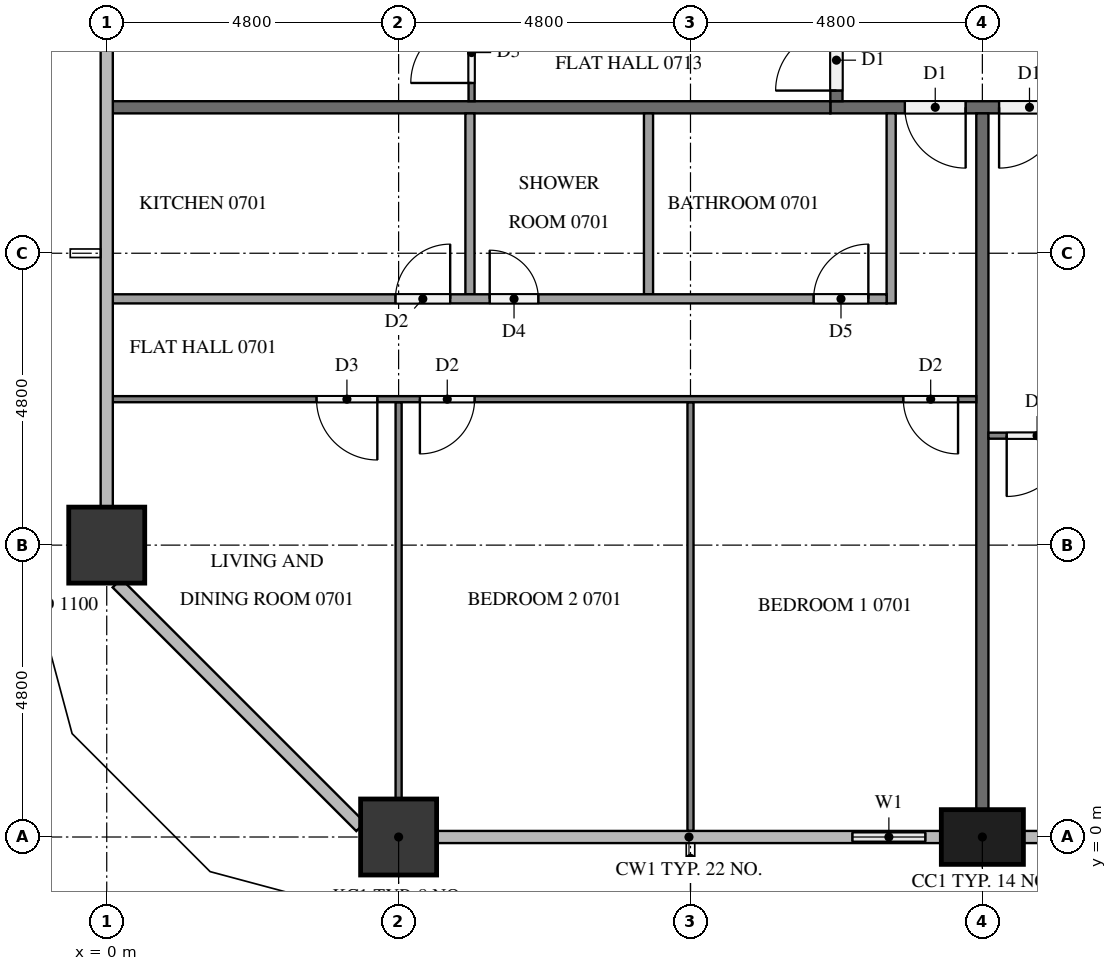
"""IFC4 building model, lengths in metres.
Left out: names, types, materials, properties, quantities, classifications, styles, units other than length and angle.
Written with IfcOpenShell. Run it as: python <this file> out.ifc"""

import sys

from ifc_helpers import new_model, si_unit, direction, frame, frame_2d, origin, origin_2d, place, context, subcontext, project, spatial, rectangle, extrude, element, fill, save


model = new_model("IFC4")
c1 = context("Model", 3, precision=1e-05, world=origin(), true_north=direction((0.0, 1.0)))
c2 = subcontext(c1, "Body", "Model", "MODEL_VIEW")
j1 = project(units=[si_unit("LENGTHUNIT", "METRE"), si_unit("PLANEANGLEUNIT", "RADIAN")], contexts=[c1])
p1 = place(None, origin())
s1 = spatial("IfcSite", under=j1, at=p1, CompositionType="ELEMENT")
p2 = place(p1, origin())
s2 = spatial("IfcBuilding", under=s1, at=p2, CompositionType="ELEMENT")
p3 = place(p2, frame((0.0, 0.0, 32.9)))
s3 = spatial("IfcBuildingStorey", under=s2, at=p3, CompositionType="ELEMENT", Elevation=32.9)
p4 = place(p3, frame((4.8, 0.0, 0.0), z_axis=(0.0, 0.0, 1.0), x_axis=(1.0, 0.0, 0.0)))
e1 = element("IfcColumn", 1, at=p4, inside=s3, PredefinedType="COLUMN", context=c2, shape_type="SweptSolid", body=[
    extrude(rectangle(XDim=1.25, YDim=1.25, at=origin_2d()), origin(), (0.0, 0.0, 1.0), 3.2),
])
p5 = place(p3, frame((14.4, 0.0, 0.0), z_axis=(0.0, 0.0, 1.0), x_axis=(1.0, 0.0, 0.0)))
e2 = element("IfcColumn", 2, at=p5, inside=s3, PredefinedType="COLUMN", context=c2, shape_type="SweptSolid", body=[
    extrude(rectangle(XDim=1.35, YDim=0.9, at=origin_2d()), origin(), (0.0, 0.0, 1.0), 3.2),
])
p6 = place(p3, frame((0.0, 4.8, 0.0), z_axis=(0.0, 0.0, 1.0), x_axis=(1.0, 0.0, 0.0)))
e3 = element("IfcColumn", 3, at=p6, inside=s3, PredefinedType="COLUMN", context=c2, shape_type="SweptSolid", body=[
    extrude(rectangle(XDim=1.25, YDim=1.25, at=origin_2d()), origin(), (0.0, 0.0, 1.0), 3.2),
])
p7 = place(p3, frame((12.0, 0.0, 0.0), z_axis=(0.0, 0.0, 1.0), x_axis=(1.0, 0.0, 0.0)))
e4 = element("IfcWall", 4, at=p7, inside=s3, PredefinedType="SOLIDWALL", context=c2, shape_type="SweptSolid", body=[
    extrude(rectangle(XDim=1.725, YDim=0.15, at=frame_2d((0.863, 0.0))), origin(), (0.0, 0.0, 1.0), 3.2),
])
p8 = place(p7, frame((0.262, 0.0, 0.9)))
e5 = element("IfcOpeningElement", 5, at=p8, cuts=e4, PredefinedType="OPENING", context=c2, shape_type="SweptSolid", body=[
    extrude(rectangle(XDim=1.2, YDim=1.4, at=frame_2d((0.6, 0.7))), frame((0.0, 0.085, 0.0), z_axis=(0.0, -1.0, 0.0), x_axis=(1.0, 0.0, 0.0)), (0.0, 0.0, 1.0), 0.17),
])
p9 = place(p3, frame((50.5, 12.0, 0.0), z_axis=(0.0, 0.0, 1.0), x_axis=(-1.0, 0.0, 0.0)))
e6 = element("IfcWall", 6, at=p9, inside=s3, PredefinedType="PARTITIONING", context=c2, shape_type="SweptSolid", body=[
    extrude(rectangle(XDim=38.6, YDim=0.2, at=frame_2d((19.3, 0.0))), origin(), (0.0, 0.0, 1.0), 3.2),
])
p10 = place(p9, frame((36.375, 0.0, 0.0)))
e7 = element("IfcOpeningElement", 7, at=p10, cuts=e6, PredefinedType="OPENING", context=c2, shape_type="SweptSolid", body=[
    extrude(rectangle(XDim=1.0, YDim=2.1, at=frame_2d((0.5, 1.05))), frame((0.0, 0.11, 0.0), z_axis=(0.0, -1.0, 0.0), x_axis=(1.0, 0.0, 0.0)), (0.0, 0.0, 1.0), 0.22),
])
p11 = place(p9, frame((34.825, 0.0, 0.0)))
e8 = element("IfcOpeningElement", 8, at=p11, cuts=e6, PredefinedType="OPENING", context=c2, shape_type="SweptSolid", body=[
    extrude(rectangle(XDim=1.0, YDim=2.1, at=frame_2d((0.5, 1.05))), frame((0.0, 0.11, 0.0), z_axis=(0.0, -1.0, 0.0), x_axis=(1.0, 0.0, 0.0)), (0.0, 0.0, 1.0), 0.22),
])
p12 = place(p9, frame((22.825, 0.0, 0.0)))
e9 = element("IfcOpeningElement", 9, at=p12, cuts=e6, PredefinedType="OPENING", context=c2, shape_type="SweptSolid", body=[
    extrude(rectangle(XDim=1.0, YDim=2.1, at=frame_2d((0.5, 1.05))), frame((0.0, 0.11, 0.0), z_axis=(0.0, -1.0, 0.0), x_axis=(1.0, 0.0, 0.0)), (0.0, 0.0, 1.0), 0.22),
])
p13 = place(p9, frame((8.425, 0.0, 0.0)))
e10 = element("IfcOpeningElement", 10, at=p13, cuts=e6, PredefinedType="OPENING", context=c2, shape_type="SweptSolid", body=[
    extrude(rectangle(XDim=1.0, YDim=2.1, at=frame_2d((0.5, 1.05))), frame((0.0, 0.11, 0.0), z_axis=(0.0, -1.0, 0.0), x_axis=(1.0, 0.0, 0.0)), (0.0, 0.0, 1.0), 0.22),
])
p14 = place(p9, frame((1.225, 0.0, 0.0)))
e11 = element("IfcOpeningElement", 11, at=p14, cuts=e6, PredefinedType="OPENING", context=c2, shape_type="SweptSolid", body=[
    extrude(rectangle(XDim=1.0, YDim=2.1, at=frame_2d((0.5, 1.05))), frame((0.0, 0.11, 0.0), z_axis=(0.0, -1.0, 0.0), x_axis=(1.0, 0.0, 0.0)), (0.0, 0.0, 1.0), 0.22),
])
p15 = place(p3, frame((12.0, 12.1, 0.0), z_axis=(0.0, 0.0, 1.0), x_axis=(0.0, 1.0, 0.0)))
e12 = element("IfcWall", 12, at=p15, inside=s3, PredefinedType="PARTITIONING", context=c2, shape_type="SweptSolid", body=[
    extrude(rectangle(XDim=28.6, YDim=0.2, at=frame_2d((14.3, 0.0))), origin(), (0.0, 0.0, 1.0), 3.2),
])
p16 = place(p15, frame((16.975, 0.0, 0.0)))
e13 = element("IfcOpeningElement", 13, at=p16, cuts=e12, PredefinedType="OPENING", context=c2, shape_type="SweptSolid", body=[
    extrude(rectangle(XDim=1.0, YDim=2.1, at=frame_2d((0.5, 1.05))), frame((0.0, 0.11, 0.0), z_axis=(0.0, -1.0, 0.0), x_axis=(1.0, 0.0, 0.0)), (0.0, 0.0, 1.0), 0.22),
])
p17 = place(p15, frame((0.175, 0.0, 0.0)))
e14 = element("IfcOpeningElement", 14, at=p17, cuts=e12, PredefinedType="OPENING", context=c2, shape_type="SweptSolid", body=[
    extrude(rectangle(XDim=1.0, YDim=2.1, at=frame_2d((0.5, 1.05))), frame((0.0, 0.11, 0.0), z_axis=(0.0, -1.0, 0.0), x_axis=(1.0, 0.0, 0.0)), (0.0, 0.0, 1.0), 0.22),
])
p18 = place(p3, frame((14.4, 11.9, 0.0), z_axis=(0.0, 0.0, 1.0), x_axis=(0.0, -1.0, 0.0)))
e15 = element("IfcWall", 15, at=p18, inside=s3, PredefinedType="PARTITIONING", context=c2, shape_type="SweptSolid", body=[
    extrude(rectangle(XDim=11.45, YDim=0.2, at=frame_2d((5.725, 0.0))), origin(), (0.0, 0.0, 1.0), 3.2),
])
p19 = place(p3, frame((0.1, 12.0, 0.0), z_axis=(0.0, 0.0, 1.0), x_axis=(1.0, 0.0, 0.0)))
e16 = element("IfcWall", 16, at=p19, inside=s3, PredefinedType="PARTITIONING", context=c2, shape_type="SweptSolid", body=[
    extrude(rectangle(XDim=11.8, YDim=0.2, at=frame_2d((5.9, 0.0))), origin(), (0.0, 0.0, 1.0), 3.2),
])
p20 = place(p3, frame((9.6, 7.15, 0.0), z_axis=(0.0, 0.0, 1.0), x_axis=(0.0, -1.0, 0.0)))
e17 = element("IfcWall", 17, at=p20, inside=s3, PredefinedType="PARTITIONING", context=c2, shape_type="SweptSolid", body=[
    extrude(rectangle(XDim=7.05, YDim=0.1, at=frame_2d((3.525, 0.0))), origin(), (0.0, 0.0, 1.0), 3.2),
])
p21 = place(p3, frame((4.8, 7.15, 0.0), z_axis=(0.0, 0.0, 1.0), x_axis=(0.0, -1.0, 0.0)))
e18 = element("IfcWall", 18, at=p21, inside=s3, PredefinedType="PARTITIONING", context=c2, shape_type="SweptSolid", body=[
    extrude(rectangle(XDim=6.525, YDim=0.1, at=frame_2d((3.262, 0.0))), origin(), (0.0, 0.0, 1.0), 3.2),
])
p22 = place(p3, frame((14.3, 7.2, 0.0), z_axis=(0.0, 0.0, 1.0), x_axis=(-1.0, 0.0, 0.0)))
e19 = element("IfcWall", 19, at=p22, inside=s3, PredefinedType="PARTITIONING", context=c2, shape_type="SweptSolid", body=[
    extrude(rectangle(XDim=14.2, YDim=0.1, at=frame_2d((7.1, 0.0))), origin(), (0.0, 0.0, 1.0), 3.2),
])
p23 = place(p22, frame((0.3, 0.0, 0.0)))
e20 = element("IfcOpeningElement", 20, at=p23, cuts=e19, PredefinedType="OPENING", context=c2, shape_type="SweptSolid", body=[
    extrude(rectangle(XDim=0.9, YDim=2.1, at=frame_2d((0.45, 1.05))), frame((0.0, 0.06, 0.0), z_axis=(0.0, -1.0, 0.0), x_axis=(1.0, 0.0, 0.0)), (0.0, 0.0, 1.0), 0.12),
])
p24 = place(p22, frame((8.25, 0.0, 0.0)))
e21 = element("IfcOpeningElement", 21, at=p24, cuts=e19, PredefinedType="OPENING", context=c2, shape_type="SweptSolid", body=[
    extrude(rectangle(XDim=0.9, YDim=2.1, at=frame_2d((0.45, 1.05))), frame((0.0, 0.06, 0.0), z_axis=(0.0, -1.0, 0.0), x_axis=(1.0, 0.0, 0.0)), (0.0, 0.0, 1.0), 0.12),
])
p25 = place(p22, frame((9.85, 0.0, 0.0)))
e22 = element("IfcOpeningElement", 22, at=p25, cuts=e19, PredefinedType="OPENING", context=c2, shape_type="SweptSolid", body=[
    extrude(rectangle(XDim=1.0, YDim=2.1, at=frame_2d((0.5, 1.05))), frame((0.0, 0.06, 0.0), z_axis=(0.0, -1.0, 0.0), x_axis=(1.0, 0.0, 0.0)), (0.0, 0.0, 1.0), 0.12),
])
for number, where, z_axis, x_axis in (
    (23, (8.91, 11.9, 0.0), (0.0, 0.0, 1.0), (0.0, -1.0, 0.0)),
    (24, (5.973, 11.9, 0.0), (0.0, 0.0, 1.0), (0.0, -1.0, 0.0)),
):
    element("IfcWall", number, at=place(p3, frame(where, z_axis=z_axis, x_axis=x_axis)), inside=s3, PredefinedType="PARTITIONING", context=c2, shape_type="SweptSolid", body=[
        extrude(rectangle(XDim=2.975, YDim=0.15, at=frame_2d((1.487, 0.0))), origin(), (0.0, 0.0, 1.0), 3.2),
    ])
p26 = place(p3, frame((12.9, 11.9, 0.0), z_axis=(0.0, 0.0, 1.0), x_axis=(0.0, -1.0, 0.0)))
e25 = element("IfcWall", 25, at=p26, inside=s3, PredefinedType="PARTITIONING", context=c2, shape_type="SweptSolid", body=[
    extrude(rectangle(XDim=3.125, YDim=0.15, at=frame_2d((1.562, 0.0))), origin(), (0.0, 0.0, 1.0), 3.2),
])
p27 = place(p3, frame((0.1, 8.85, 0.0), z_axis=(0.0, 0.0, 1.0), x_axis=(1.0, 0.0, 0.0)))
e26 = element("IfcWall", 26, at=p27, inside=s3, PredefinedType="PARTITIONING", context=c2, shape_type="SweptSolid", body=[
    extrude(rectangle(XDim=12.725, YDim=0.15, at=frame_2d((6.362, 0.0))), origin(), (0.0, 0.0, 1.0), 3.2),
])
p28 = place(p27, frame((11.525, 0.0, 0.0)))
e27 = element("IfcOpeningElement", 27, at=p28, cuts=e26, PredefinedType="OPENING", context=c2, shape_type="SweptSolid", body=[
    extrude(rectangle(XDim=0.9, YDim=2.1, at=frame_2d((0.45, 1.05))), frame((0.0, 0.085, 0.0), z_axis=(0.0, -1.0, 0.0), x_axis=(1.0, 0.0, 0.0)), (0.0, 0.0, 1.0), 0.17),
])
p29 = place(p27, frame((6.198, 0.0, 0.0)))
e28 = element("IfcOpeningElement", 28, at=p29, cuts=e26, PredefinedType="OPENING", context=c2, shape_type="SweptSolid", body=[
    extrude(rectangle(XDim=0.8, YDim=2.1, at=frame_2d((0.4, 1.05))), frame((0.0, 0.085, 0.0), z_axis=(0.0, -1.0, 0.0), x_axis=(1.0, 0.0, 0.0)), (0.0, 0.0, 1.0), 0.17),
])
p30 = place(p27, frame((4.648, 0.0, 0.0)))
e29 = element("IfcOpeningElement", 29, at=p30, cuts=e26, PredefinedType="OPENING", context=c2, shape_type="SweptSolid", body=[
    extrude(rectangle(XDim=0.9, YDim=2.1, at=frame_2d((0.45, 1.05))), frame((0.0, 0.085, 0.0), z_axis=(0.0, -1.0, 0.0), x_axis=(1.0, 0.0, 0.0)), (0.0, 0.0, 1.0), 0.17),
])
p31 = place(p3, frame((26.3, 6.6, 0.0), z_axis=(0.0, 0.0, 1.0), x_axis=(-1.0, 0.0, 0.0)))
e30 = element("IfcWall", 30, at=p31, inside=s3, PredefinedType="PARTITIONING", context=c2, shape_type="SweptSolid", body=[
    extrude(rectangle(XDim=11.8, YDim=0.1, at=frame_2d((5.9, 0.0))), origin(), (0.0, 0.0, 1.0), 3.2),
])
p32 = place(p31, frame((10.5, 0.0, 0.0)))
e31 = element("IfcOpeningElement", 31, at=p32, cuts=e30, PredefinedType="OPENING", context=c2, shape_type="SweptSolid", body=[
    extrude(rectangle(XDim=1.0, YDim=2.1, at=frame_2d((0.5, 1.05))), frame((0.0, 0.06, 0.0), z_axis=(0.0, -1.0, 0.0), x_axis=(1.0, 0.0, 0.0)), (0.0, 0.0, 1.0), 0.12),
])
p33 = place(p31, frame((0.3, 0.0, 0.0)))
e32 = element("IfcOpeningElement", 32, at=p33, cuts=e30, PredefinedType="OPENING", context=c2, shape_type="SweptSolid", body=[
    extrude(rectangle(XDim=0.9, YDim=2.1, at=frame_2d((0.45, 1.05))), frame((0.0, 0.06, 0.0), z_axis=(0.0, -1.0, 0.0), x_axis=(1.0, 0.0, 0.0)), (0.0, 0.0, 1.0), 0.12),
])
p34 = place(p3, frame((6.0, 12.1, 0.0), z_axis=(0.0, 0.0, 1.0), x_axis=(0.0, 1.0, 0.0)))
e33 = element("IfcWall", 33, at=p34, inside=s3, PredefinedType="PARTITIONING", context=c2, shape_type="SweptSolid", body=[
    extrude(rectangle(XDim=16.6, YDim=0.1, at=frame_2d((8.3, 0.0))), origin(), (0.0, 0.0, 1.0), 3.2),
])
p35 = place(p34, frame((0.3, 0.0, 0.0)))
e34 = element("IfcOpeningElement", 34, at=p35, cuts=e33, PredefinedType="OPENING", context=c2, shape_type="SweptSolid", body=[
    extrude(rectangle(XDim=1.0, YDim=2.1, at=frame_2d((0.5, 1.05))), frame((0.0, 0.06, 0.0), z_axis=(0.0, -1.0, 0.0), x_axis=(1.0, 0.0, 0.0)), (0.0, 0.0, 1.0), 0.12),
])
p36 = place(p34, frame((10.65, 0.0, 0.0)))
e35 = element("IfcOpeningElement", 35, at=p36, cuts=e33, PredefinedType="OPENING", context=c2, shape_type="SweptSolid", body=[
    extrude(rectangle(XDim=0.9, YDim=2.1, at=frame_2d((0.45, 1.05))), frame((0.0, 0.06, 0.0), z_axis=(0.0, -1.0, 0.0), x_axis=(1.0, 0.0, 0.0)), (0.0, 0.0, 1.0), 0.12),
])
p37 = place(p34, frame((12.25, 0.0, 0.0)))
e36 = element("IfcOpeningElement", 36, at=p37, cuts=e33, PredefinedType="OPENING", context=c2, shape_type="SweptSolid", body=[
    extrude(rectangle(XDim=0.9, YDim=2.1, at=frame_2d((0.45, 1.05))), frame((0.0, 0.06, 0.0), z_axis=(0.0, -1.0, 0.0), x_axis=(1.0, 0.0, 0.0)), (0.0, 0.0, 1.0), 0.12),
])
p38 = place(p8, origin())
e37 = element("IfcWindow", 37, at=p38, inside=s3, PartitioningType="SINGLE_PANEL", PredefinedType="WINDOW", context=c2, shape_type="SweptSolid", body=[
    extrude(rectangle(XDim=1.2, YDim=1.4, at=frame_2d((0.6, 0.7))), frame((0.0, 0.03, 0.0), z_axis=(0.0, -1.0, 0.0), x_axis=(1.0, 0.0, 0.0)), (0.0, 0.0, 1.0), 0.06),
])
fill(e5, e37)
p39 = place(p10, origin())
e38 = element("IfcDoor", 38, at=p39, inside=s3, OperationType="SINGLE_SWING_LEFT", PredefinedType="DOOR", context=c2, shape_type="SweptSolid", body=[
    extrude(rectangle(XDim=1.0, YDim=2.1, at=frame_2d((0.5, 1.05))), frame((0.0, 0.025, 0.0), z_axis=(0.0, -1.0, 0.0), x_axis=(1.0, 0.0, 0.0)), (0.0, 0.0, 1.0), 0.05),
])
fill(e7, e38)
p40 = place(p11, origin())
e39 = element("IfcDoor", 39, at=p40, inside=s3, OperationType="SINGLE_SWING_RIGHT", PredefinedType="DOOR", context=c2, shape_type="SweptSolid", body=[
    extrude(rectangle(XDim=1.0, YDim=2.1, at=frame_2d((0.5, 1.05))), frame((0.0, 0.025, 0.0), z_axis=(0.0, -1.0, 0.0), x_axis=(1.0, 0.0, 0.0)), (0.0, 0.0, 1.0), 0.05),
])
fill(e8, e39)
p41 = place(p17, origin())
e40 = element("IfcDoor", 40, at=p41, inside=s3, OperationType="SINGLE_SWING_LEFT", PredefinedType="DOOR", context=c2, shape_type="SweptSolid", body=[
    extrude(rectangle(XDim=1.0, YDim=2.1, at=frame_2d((0.5, 1.05))), frame((0.0, 0.025, 0.0), z_axis=(0.0, -1.0, 0.0), x_axis=(1.0, 0.0, 0.0)), (0.0, 0.0, 1.0), 0.05),
])
fill(e14, e40)
p42 = place(p23, origin())
e41 = element("IfcDoor", 41, at=p42, inside=s3, OperationType="SINGLE_SWING_LEFT", PredefinedType="DOOR", context=c2, shape_type="SweptSolid", body=[
    extrude(rectangle(XDim=0.9, YDim=2.1, at=frame_2d((0.45, 1.05))), frame((0.0, 0.025, 0.0), z_axis=(0.0, -1.0, 0.0), x_axis=(1.0, 0.0, 0.0)), (0.0, 0.0, 1.0), 0.05),
])
fill(e20, e41)
p43 = place(p24, origin())
e42 = element("IfcDoor", 42, at=p43, inside=s3, OperationType="SINGLE_SWING_RIGHT", PredefinedType="DOOR", context=c2, shape_type="SweptSolid", body=[
    extrude(rectangle(XDim=0.9, YDim=2.1, at=frame_2d((0.45, 1.05))), frame((0.0, 0.025, 0.0), z_axis=(0.0, -1.0, 0.0), x_axis=(1.0, 0.0, 0.0)), (0.0, 0.0, 1.0), 0.05),
])
fill(e21, e42)
p44 = place(p25, origin())
e43 = element("IfcDoor", 43, at=p44, inside=s3, OperationType="SINGLE_SWING_LEFT", PredefinedType="DOOR", context=c2, shape_type="SweptSolid", body=[
    extrude(rectangle(XDim=1.0, YDim=2.1, at=frame_2d((0.5, 1.05))), frame((0.0, 0.025, 0.0), z_axis=(0.0, -1.0, 0.0), x_axis=(1.0, 0.0, 0.0)), (0.0, 0.0, 1.0), 0.05),
])
fill(e22, e43)
p45 = place(p28, origin())
e44 = element("IfcDoor", 44, at=p45, inside=s3, OperationType="SINGLE_SWING_RIGHT", PredefinedType="DOOR", context=c2, shape_type="SweptSolid", body=[
    extrude(rectangle(XDim=0.9, YDim=2.1, at=frame_2d((0.45, 1.05))), frame((0.0, 0.025, 0.0), z_axis=(0.0, -1.0, 0.0), x_axis=(1.0, 0.0, 0.0)), (0.0, 0.0, 1.0), 0.05),
])
fill(e27, e44)
p46 = place(p29, origin())
e45 = element("IfcDoor", 45, at=p46, inside=s3, OperationType="SINGLE_SWING_LEFT", PredefinedType="DOOR", context=c2, shape_type="SweptSolid", body=[
    extrude(rectangle(XDim=0.8, YDim=2.1, at=frame_2d((0.4, 1.05))), frame((0.0, 0.025, 0.0), z_axis=(0.0, -1.0, 0.0), x_axis=(1.0, 0.0, 0.0)), (0.0, 0.0, 1.0), 0.05),
])
fill(e28, e45)
p47 = place(p30, origin())
e46 = element("IfcDoor", 46, at=p47, inside=s3, OperationType="SINGLE_SWING_RIGHT", PredefinedType="DOOR", context=c2, shape_type="SweptSolid", body=[
    extrude(rectangle(XDim=0.9, YDim=2.1, at=frame_2d((0.45, 1.05))), frame((0.0, 0.025, 0.0), z_axis=(0.0, -1.0, 0.0), x_axis=(1.0, 0.0, 0.0)), (0.0, 0.0, 1.0), 0.05),
])
fill(e29, e46)
p48 = place(p32, origin())
e47 = element("IfcDoor", 47, at=p48, inside=s3, OperationType="SINGLE_SWING_RIGHT", PredefinedType="DOOR", context=c2, shape_type="SweptSolid", body=[
    extrude(rectangle(XDim=1.0, YDim=2.1, at=frame_2d((0.5, 1.05))), frame((0.0, 0.025, 0.0), z_axis=(0.0, -1.0, 0.0), x_axis=(1.0, 0.0, 0.0)), (0.0, 0.0, 1.0), 0.05),
])
fill(e31, e47)
p49 = place(p35, origin())
e48 = element("IfcDoor", 48, at=p49, inside=s3, OperationType="SINGLE_SWING_LEFT", PredefinedType="DOOR", context=c2, shape_type="SweptSolid", body=[
    extrude(rectangle(XDim=1.0, YDim=2.1, at=frame_2d((0.5, 1.05))), frame((0.0, 0.025, 0.0), z_axis=(0.0, -1.0, 0.0), x_axis=(1.0, 0.0, 0.0)), (0.0, 0.0, 1.0), 0.05),
])
fill(e34, e48)
save(model, sys.argv[1])
